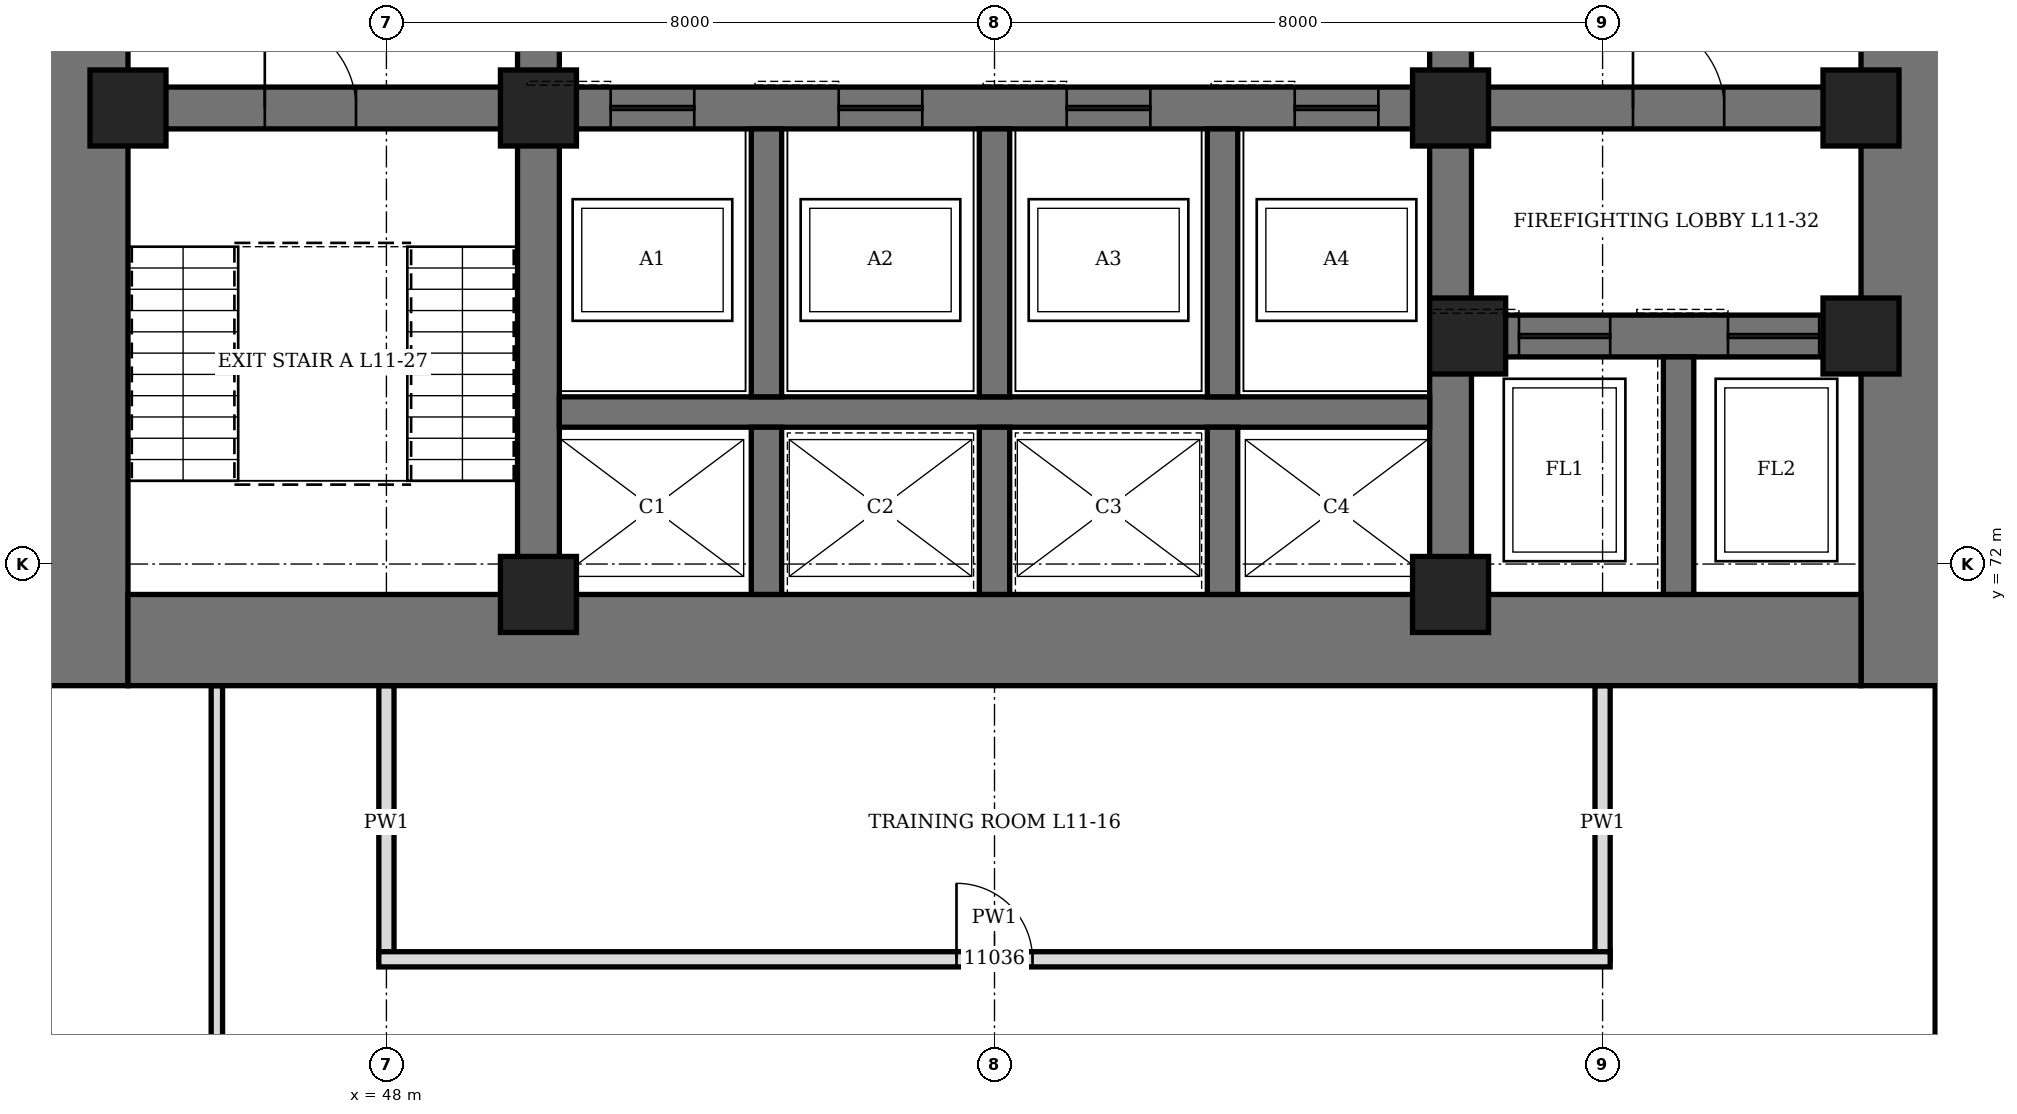
"""IFC4 building model, lengths in metres.
Left out: names, types, materials, properties, quantities, classifications, styles, units other than length and angle.
Written with IfcOpenShell. Run it as: python <this file> out.ifc"""

import sys

from ifc_helpers import new_model, si_unit, direction, frame, frame_2d, origin, origin_2d, place, context, subcontext, project, spatial, rectangle, hollow_rectangle, extrude, element, fill, save


model = new_model("IFC4")
c1 = context("Model", 3, precision=1e-05, world=origin(), true_north=direction((0.0, 1.0)))
c2 = subcontext(c1, "Body", "Model", "MODEL_VIEW")
j1 = project(units=[si_unit("LENGTHUNIT", "METRE"), si_unit("PLANEANGLEUNIT", "RADIAN")], contexts=[c1])
p1 = place(None, origin())
s1 = spatial("IfcSite", under=j1, at=p1, CompositionType="ELEMENT")
p2 = place(p1, origin())
s2 = spatial("IfcBuilding", under=s1, at=p2, CompositionType="ELEMENT")
p3 = place(p2, frame((0.0, 0.0, 55.9)))
s3 = spatial("IfcBuildingStorey", under=s2, at=p3, CompositionType="ELEMENT", Elevation=55.9)
p4 = place(p3, frame((44.0, 70.4, 0.0), z_axis=(0.0, 0.0, 1.0), x_axis=(0.0, 1.0, 0.0)))
e1 = element("IfcWall", 1, at=p4, inside=s3, PredefinedType="SHEAR", context=c2, shape_type="SweptSolid", body=[
    extrude(rectangle(XDim=19.2, YDim=1.2, at=frame_2d((9.6, 0.0))), origin(), (0.0, 0.0, 1.0), 4.2),
])
p5 = place(p4, frame((8.6, 0.0, 0.0)))
e2 = element("IfcOpeningElement", 2, at=p5, cuts=e1, PredefinedType="OPENING", context=c2, shape_type="SweptSolid", body=[
    extrude(rectangle(XDim=2.0, YDim=2.4, at=frame_2d((1.0, 1.2))), frame((0.0, 0.61, 0.0), z_axis=(0.0, -1.0, 0.0), x_axis=(1.0, 0.0, 0.0)), (0.0, 0.0, 1.0), 1.22),
])
p6 = place(p3, frame((68.0, 70.4, 0.0), z_axis=(0.0, 0.0, 1.0), x_axis=(0.0, 1.0, 0.0)))
e3 = element("IfcWall", 3, at=p6, inside=s3, PredefinedType="SHEAR", context=c2, shape_type="SweptSolid", body=[
    extrude(rectangle(XDim=19.2, YDim=1.2, at=frame_2d((9.6, 0.0))), origin(), (0.0, 0.0, 1.0), 4.2),
])
p7 = place(p6, frame((8.6, 0.0, 0.0)))
e4 = element("IfcOpeningElement", 4, at=p7, cuts=e3, PredefinedType="OPENING", context=c2, shape_type="SweptSolid", body=[
    extrude(rectangle(XDim=2.0, YDim=2.4, at=frame_2d((1.0, 1.2))), frame((0.0, 0.61, 0.0), z_axis=(0.0, -1.0, 0.0), x_axis=(1.0, 0.0, 0.0)), (0.0, 0.0, 1.0), 1.22),
])
p8 = place(p3, frame((44.6, 71.0, 0.0), z_axis=(0.0, 0.0, 1.0), x_axis=(1.0, 0.0, 0.0)))
e5 = element("IfcWall", 5, at=p8, inside=s3, PredefinedType="SHEAR", context=c2, shape_type="SweptSolid", body=[
    extrude(rectangle(XDim=22.8, YDim=1.2, at=frame_2d((11.4, 0.0))), origin(), (0.0, 0.0, 1.0), 4.2),
])
p9 = place(p3, frame((50.0, 71.6, 0.0), z_axis=(0.0, 0.0, 1.0), x_axis=(0.0, 1.0, 0.0)))
e6 = element("IfcWall", 6, at=p9, inside=s3, PredefinedType="SHEAR", context=c2, shape_type="SweptSolid", body=[
    extrude(rectangle(XDim=16.8, YDim=0.55, at=frame_2d((8.4, 0.0))), origin(), (0.0, 0.0, 1.0), 4.2),
])
p10 = place(p9, frame((7.5, 0.0, 0.0)))
e7 = element("IfcOpeningElement", 7, at=p10, cuts=e6, PredefinedType="OPENING", context=c2, shape_type="SweptSolid", body=[
    extrude(rectangle(XDim=1.8, YDim=2.4, at=frame_2d((0.9, 1.2))), frame((0.0, 0.285, 0.0), z_axis=(0.0, -1.0, 0.0), x_axis=(1.0, 0.0, 0.0)), (0.0, 0.0, 1.0), 0.57),
])
p11 = place(p3, frame((62.0, 71.6, 0.0), z_axis=(0.0, 0.0, 1.0), x_axis=(0.0, 1.0, 0.0)))
e8 = element("IfcWall", 8, at=p11, inside=s3, PredefinedType="SHEAR", context=c2, shape_type="SweptSolid", body=[
    extrude(rectangle(XDim=16.8, YDim=0.55, at=frame_2d((8.4, 0.0))), origin(), (0.0, 0.0, 1.0), 4.2),
])
p12 = place(p11, frame((7.5, 0.0, 0.0)))
e9 = element("IfcOpeningElement", 9, at=p12, cuts=e8, PredefinedType="OPENING", context=c2, shape_type="SweptSolid", body=[
    extrude(rectangle(XDim=1.8, YDim=2.4, at=frame_2d((0.9, 1.2))), frame((0.0, 0.285, 0.0), z_axis=(0.0, -1.0, 0.0), x_axis=(1.0, 0.0, 0.0)), (0.0, 0.0, 1.0), 0.57),
])
p13 = place(p3, frame((44.6, 78.0, 0.0), z_axis=(0.0, 0.0, 1.0), x_axis=(1.0, 0.0, 0.0)))
e10 = element("IfcWall", 10, at=p13, inside=s3, PredefinedType="SHEAR", context=c2, shape_type="SweptSolid", body=[
    extrude(rectangle(XDim=5.125, YDim=0.55, at=frame_2d((2.562, 0.0))), origin(), (0.0, 0.0, 1.0), 4.2),
])
p14 = place(p13, frame((1.8, 0.0, 0.0)))
e11 = element("IfcOpeningElement", 11, at=p14, cuts=e10, PredefinedType="OPENING", context=c2, shape_type="SweptSolid", body=[
    extrude(rectangle(XDim=1.2, YDim=2.1, at=frame_2d((0.6, 1.05))), frame((0.0, 0.285, 0.0), z_axis=(0.0, -1.0, 0.0), x_axis=(1.0, 0.0, 0.0)), (0.0, 0.0, 1.0), 0.57),
])
p15 = place(p3, frame((62.275, 75.0, 0.0), z_axis=(0.0, 0.0, 1.0), x_axis=(1.0, 0.0, 0.0)))
e12 = element("IfcWall", 12, at=p15, inside=s3, PredefinedType="SHEAR", context=c2, shape_type="SweptSolid", body=[
    extrude(rectangle(XDim=5.125, YDim=0.55, at=frame_2d((2.562, 0.0))), origin(), (0.0, 0.0, 1.0), 4.2),
])
p16 = place(p15, frame((0.625, 0.0, 0.0)))
e13 = element("IfcOpeningElement", 13, at=p16, cuts=e12, PredefinedType="OPENING", context=c2, shape_type="SweptSolid", body=[
    extrude(rectangle(XDim=1.2, YDim=2.2, at=frame_2d((0.6, 1.1))), frame((0.0, 0.285, 0.0), z_axis=(0.0, -1.0, 0.0), x_axis=(1.0, 0.0, 0.0)), (0.0, 0.0, 1.0), 0.57),
])
p17 = place(p15, frame((3.375, 0.0, 0.0)))
e14 = element("IfcOpeningElement", 14, at=p17, cuts=e12, PredefinedType="OPENING", context=c2, shape_type="SweptSolid", body=[
    extrude(rectangle(XDim=1.2, YDim=2.2, at=frame_2d((0.6, 1.1))), frame((0.0, 0.285, 0.0), z_axis=(0.0, -1.0, 0.0), x_axis=(1.0, 0.0, 0.0)), (0.0, 0.0, 1.0), 0.57),
])
p18 = place(p3, frame((62.275, 78.0, 0.0), z_axis=(0.0, 0.0, 1.0), x_axis=(1.0, 0.0, 0.0)))
e15 = element("IfcWall", 15, at=p18, inside=s3, PredefinedType="SHEAR", context=c2, shape_type="SweptSolid", body=[
    extrude(rectangle(XDim=5.125, YDim=0.55, at=frame_2d((2.562, 0.0))), origin(), (0.0, 0.0, 1.0), 4.2),
])
p19 = place(p18, frame((2.125, 0.0, 0.0)))
e16 = element("IfcOpeningElement", 16, at=p19, cuts=e15, PredefinedType="OPENING", context=c2, shape_type="SweptSolid", body=[
    extrude(rectangle(XDim=1.2, YDim=2.1, at=frame_2d((0.6, 1.05))), frame((0.0, 0.285, 0.0), z_axis=(0.0, -1.0, 0.0), x_axis=(1.0, 0.0, 0.0)), (0.0, 0.0, 1.0), 0.57),
])
p20 = place(p3, frame((50.275, 78.0, 0.0), z_axis=(0.0, 0.0, 1.0), x_axis=(1.0, 0.0, 0.0)))
e17 = element("IfcWall", 17, at=p20, inside=s3, PredefinedType="SHEAR", context=c2, shape_type="SweptSolid", body=[
    extrude(rectangle(XDim=11.45, YDim=0.55, at=frame_2d((5.725, 0.0))), origin(), (0.0, 0.0, 1.0), 4.2),
])
p21 = place(p20, frame((0.675, 0.0, 0.0)))
e18 = element("IfcOpeningElement", 18, at=p21, cuts=e17, PredefinedType="OPENING", context=c2, shape_type="SweptSolid", body=[
    extrude(rectangle(XDim=1.1, YDim=2.2, at=frame_2d((0.55, 1.1))), frame((0.0, 0.285, 0.0), z_axis=(0.0, -1.0, 0.0), x_axis=(1.0, 0.0, 0.0)), (0.0, 0.0, 1.0), 0.57),
])
p22 = place(p20, frame((3.675, 0.0, 0.0)))
e19 = element("IfcOpeningElement", 19, at=p22, cuts=e17, PredefinedType="OPENING", context=c2, shape_type="SweptSolid", body=[
    extrude(rectangle(XDim=1.1, YDim=2.2, at=frame_2d((0.55, 1.1))), frame((0.0, 0.285, 0.0), z_axis=(0.0, -1.0, 0.0), x_axis=(1.0, 0.0, 0.0)), (0.0, 0.0, 1.0), 0.57),
])
p23 = place(p20, frame((6.675, 0.0, 0.0)))
e20 = element("IfcOpeningElement", 20, at=p23, cuts=e17, PredefinedType="OPENING", context=c2, shape_type="SweptSolid", body=[
    extrude(rectangle(XDim=1.1, YDim=2.2, at=frame_2d((0.55, 1.1))), frame((0.0, 0.285, 0.0), z_axis=(0.0, -1.0, 0.0), x_axis=(1.0, 0.0, 0.0)), (0.0, 0.0, 1.0), 0.57),
])
p24 = place(p20, frame((9.675, 0.0, 0.0)))
e21 = element("IfcOpeningElement", 21, at=p24, cuts=e17, PredefinedType="OPENING", context=c2, shape_type="SweptSolid", body=[
    extrude(rectangle(XDim=1.1, YDim=2.2, at=frame_2d((0.55, 1.1))), frame((0.0, 0.285, 0.0), z_axis=(0.0, -1.0, 0.0), x_axis=(1.0, 0.0, 0.0)), (0.0, 0.0, 1.0), 0.57),
])
p25 = place(p3, frame((50.275, 74.0, 0.0), z_axis=(0.0, 0.0, 1.0), x_axis=(1.0, 0.0, 0.0)))
e22 = element("IfcWall", 22, at=p25, inside=s3, PredefinedType="SHEAR", context=c2, shape_type="SweptSolid", body=[
    extrude(rectangle(XDim=11.45, YDim=0.4, at=frame_2d((5.725, 0.0))), origin(), (0.0, 0.0, 1.0), 4.2),
])
p26 = place(p3, frame((53.0, 71.6, 0.0), z_axis=(0.0, 0.0, 1.0), x_axis=(0.0, 1.0, 0.0)))
e23 = element("IfcWall", 23, at=p26, inside=s3, PredefinedType="SHEAR", context=c2, shape_type="SweptSolid", body=[
    extrude(rectangle(XDim=2.2, YDim=0.4, at=frame_2d((1.1, 0.0))), origin(), (0.0, 0.0, 1.0), 4.2),
])
p27 = place(p3, frame((53.0, 74.2, 0.0), z_axis=(0.0, 0.0, 1.0), x_axis=(0.0, 1.0, 0.0)))
e24 = element("IfcWall", 24, at=p27, inside=s3, PredefinedType="SHEAR", context=c2, shape_type="SweptSolid", body=[
    extrude(rectangle(XDim=3.525, YDim=0.4, at=frame_2d((1.763, 0.0))), origin(), (0.0, 0.0, 1.0), 4.2),
])
p28 = place(p3, frame((56.0, 71.6, 0.0), z_axis=(0.0, 0.0, 1.0), x_axis=(0.0, 1.0, 0.0)))
e25 = element("IfcWall", 25, at=p28, inside=s3, PredefinedType="SHEAR", context=c2, shape_type="SweptSolid", body=[
    extrude(rectangle(XDim=2.2, YDim=0.4, at=frame_2d((1.1, 0.0))), origin(), (0.0, 0.0, 1.0), 4.2),
])
p29 = place(p3, frame((56.0, 74.2, 0.0), z_axis=(0.0, 0.0, 1.0), x_axis=(0.0, 1.0, 0.0)))
e26 = element("IfcWall", 26, at=p29, inside=s3, PredefinedType="SHEAR", context=c2, shape_type="SweptSolid", body=[
    extrude(rectangle(XDim=3.525, YDim=0.4, at=frame_2d((1.763, 0.0))), origin(), (0.0, 0.0, 1.0), 4.2),
])
p30 = place(p3, frame((59.0, 71.6, 0.0), z_axis=(0.0, 0.0, 1.0), x_axis=(0.0, 1.0, 0.0)))
e27 = element("IfcWall", 27, at=p30, inside=s3, PredefinedType="SHEAR", context=c2, shape_type="SweptSolid", body=[
    extrude(rectangle(XDim=2.2, YDim=0.4, at=frame_2d((1.1, 0.0))), origin(), (0.0, 0.0, 1.0), 4.2),
])
p31 = place(p3, frame((59.0, 74.2, 0.0), z_axis=(0.0, 0.0, 1.0), x_axis=(0.0, 1.0, 0.0)))
e28 = element("IfcWall", 28, at=p31, inside=s3, PredefinedType="SHEAR", context=c2, shape_type="SweptSolid", body=[
    extrude(rectangle(XDim=3.525, YDim=0.4, at=frame_2d((1.763, 0.0))), origin(), (0.0, 0.0, 1.0), 4.2),
])
p32 = place(p3, frame((65.0, 71.6, 0.0), z_axis=(0.0, 0.0, 1.0), x_axis=(0.0, 1.0, 0.0)))
e29 = element("IfcWall", 29, at=p32, inside=s3, PredefinedType="SHEAR", context=c2, shape_type="SweptSolid", body=[
    extrude(rectangle(XDim=3.125, YDim=0.4, at=frame_2d((1.562, 0.0))), origin(), (0.0, 0.0, 1.0), 4.2),
])
for number, where, z_axis, x_axis in (
    (30, (44.6, 78.0, 0.0), (0.0, 0.0, 1.0), (1.0, 0.0, 0.0)),
    (31, (50.0, 71.6, 0.0), (0.0, 0.0, 1.0), (1.0, 0.0, 0.0)),
    (32, (50.0, 78.0, 0.0), (0.0, 0.0, 1.0), (1.0, 0.0, 0.0)),
    (33, (62.0, 71.6, 0.0), (0.0, 0.0, 1.0), (1.0, 0.0, 0.0)),
    (34, (62.0, 78.0, 0.0), (0.0, 0.0, 1.0), (1.0, 0.0, 0.0)),
    (35, (62.225, 75.0, 0.0), (0.0, 0.0, 1.0), (1.0, 0.0, 0.0)),
    (36, (67.4, 75.0, 0.0), (0.0, 0.0, 1.0), (1.0, 0.0, 0.0)),
    (37, (67.4, 78.0, 0.0), (0.0, 0.0, 1.0), (1.0, 0.0, 0.0)),
):
    element("IfcColumn", number, at=place(p3, frame(where, z_axis=z_axis, x_axis=x_axis)), inside=s3, PredefinedType="COLUMN", context=c2, shape_type="SweptSolid", body=[
        extrude(hollow_rectangle(XDim=1.0, YDim=1.0, WallThickness=0.15, at=origin_2d()), origin(), (0.0, 0.0, 1.0), 4.2),
    ])
for number, where, z_axis, x_axis in (
    (38, (48.0, 66.8, 0.0), (0.0, 0.0, 1.0), (0.0, 1.0, 0.0)),
    (39, (64.0, 66.8, 0.0), (0.0, 0.0, 1.0), (0.0, 1.0, 0.0)),
):
    element("IfcWall", number, at=place(p3, frame(where, z_axis=z_axis, x_axis=x_axis)), inside=s3, PredefinedType="PARTITIONING", context=c2, shape_type="SweptSolid", body=[
        extrude(rectangle(XDim=3.6, YDim=0.2, at=frame_2d((1.8, 0.0))), origin(), (0.0, 0.0, 1.0), 4.04),
    ])
p33 = place(p3, frame((47.9, 66.8, 0.0), z_axis=(0.0, 0.0, 1.0), x_axis=(1.0, 0.0, 0.0)))
e40 = element("IfcWall", 40, at=p33, inside=s3, PredefinedType="PARTITIONING", context=c2, shape_type="SweptSolid", body=[
    extrude(rectangle(XDim=16.2, YDim=0.2, at=frame_2d((8.1, 0.0))), origin(), (0.0, 0.0, 1.0), 4.04),
])
p34 = place(p33, frame((7.6, 0.0, 0.0)))
e41 = element("IfcOpeningElement", 41, at=p34, cuts=e40, PredefinedType="OPENING", context=c2, shape_type="SweptSolid", body=[
    extrude(rectangle(XDim=1.0, YDim=2.1, at=frame_2d((0.5, 1.05))), frame((0.0, 0.11, 0.0), z_axis=(0.0, -1.0, 0.0), x_axis=(1.0, 0.0, 0.0)), (0.0, 0.0, 1.0), 0.22),
])
p35 = place(p3, frame((45.769, 55.31, 0.0), z_axis=(0.0, 0.0, 1.0), x_axis=(0.0, 1.0, 0.0)))
e42 = element("IfcWall", 42, at=p35, inside=s3, PredefinedType="PARTITIONING", context=c2, shape_type="SweptSolid", body=[
    extrude(rectangle(XDim=15.09, YDim=0.15, at=frame_2d((7.545, 0.0))), origin(), (0.0, 0.0, 1.0), 3.278),
])
p36 = place(p35, frame((7.045, 0.0, 0.0)))
e43 = element("IfcOpeningElement", 43, at=p36, cuts=e42, PredefinedType="OPENING", context=c2, shape_type="SweptSolid", body=[
    extrude(rectangle(XDim=1.0, YDim=2.4, at=frame_2d((0.5, 1.2))), frame((0.0, 0.085, 0.0), z_axis=(0.0, -1.0, 0.0), x_axis=(1.0, 0.0, 0.0)), (0.0, 0.0, 1.0), 0.17),
])
p37 = place(p3, frame((68.45, 55.31, 0.0), z_axis=(0.0, 0.0, 1.0), x_axis=(0.0, 1.0, 0.0)))
e44 = element("IfcWall", 44, at=p37, inside=s3, PredefinedType="PARTITIONING", context=c2, shape_type="SweptSolid", body=[
    extrude(rectangle(XDim=15.09, YDim=0.15, at=frame_2d((7.545, 0.0))), origin(), (0.0, 0.0, 1.0), 4.04),
])
p38 = place(p37, frame((7.045, 0.0, 0.0)))
e45 = element("IfcOpeningElement", 45, at=p38, cuts=e44, PredefinedType="OPENING", context=c2, shape_type="SweptSolid", body=[
    extrude(rectangle(XDim=1.0, YDim=2.4, at=frame_2d((0.5, 1.2))), frame((0.0, 0.085, 0.0), z_axis=(0.0, -1.0, 0.0), x_axis=(1.0, 0.0, 0.0)), (0.0, 0.0, 1.0), 0.17),
])
p39 = place(p14, origin())
e46 = element("IfcDoor", 46, at=p39, inside=s3, OperationType="SINGLE_SWING_LEFT", PredefinedType="DOOR", context=c2, shape_type="SweptSolid", body=[
    extrude(rectangle(XDim=1.2, YDim=2.1, at=frame_2d((0.6, 1.05))), frame((0.0, 0.275, 0.0), z_axis=(0.0, -1.0, 0.0), x_axis=(1.0, 0.0, 0.0)), (0.0, 0.0, 1.0), 0.55),
])
fill(e11, e46)
p40 = place(p19, origin())
e47 = element("IfcDoor", 47, at=p40, inside=s3, OperationType="SINGLE_SWING_RIGHT", PredefinedType="DOOR", context=c2, shape_type="SweptSolid", body=[
    extrude(rectangle(XDim=1.2, YDim=2.1, at=frame_2d((0.6, 1.05))), frame((0.0, 0.275, 0.0), z_axis=(0.0, -1.0, 0.0), x_axis=(1.0, 0.0, 0.0)), (0.0, 0.0, 1.0), 0.55),
])
fill(e16, e47)
p41 = place(p21, origin())
e48 = element("IfcDoor", 48, at=p41, inside=s3, OperationType="SLIDING_TO_LEFT", PredefinedType="DOOR", context=c2, shape_type="SweptSolid", body=[
    extrude(rectangle(XDim=1.1, YDim=2.2, at=frame_2d((0.55, 1.1))), frame((0.0, 0.275, 0.0), z_axis=(0.0, -1.0, 0.0), x_axis=(1.0, 0.0, 0.0)), (0.0, 0.0, 1.0), 0.55),
])
fill(e18, e48)
p42 = place(p22, origin())
e49 = element("IfcDoor", 49, at=p42, inside=s3, OperationType="SLIDING_TO_LEFT", PredefinedType="DOOR", context=c2, shape_type="SweptSolid", body=[
    extrude(rectangle(XDim=1.1, YDim=2.2, at=frame_2d((0.55, 1.1))), frame((0.0, 0.275, 0.0), z_axis=(0.0, -1.0, 0.0), x_axis=(1.0, 0.0, 0.0)), (0.0, 0.0, 1.0), 0.55),
])
fill(e19, e49)
p43 = place(p23, origin())
e50 = element("IfcDoor", 50, at=p43, inside=s3, OperationType="SLIDING_TO_LEFT", PredefinedType="DOOR", context=c2, shape_type="SweptSolid", body=[
    extrude(rectangle(XDim=1.1, YDim=2.2, at=frame_2d((0.55, 1.1))), frame((0.0, 0.275, 0.0), z_axis=(0.0, -1.0, 0.0), x_axis=(1.0, 0.0, 0.0)), (0.0, 0.0, 1.0), 0.55),
])
fill(e20, e50)
p44 = place(p24, origin())
e51 = element("IfcDoor", 51, at=p44, inside=s3, OperationType="SLIDING_TO_LEFT", PredefinedType="DOOR", context=c2, shape_type="SweptSolid", body=[
    extrude(rectangle(XDim=1.1, YDim=2.2, at=frame_2d((0.55, 1.1))), frame((0.0, 0.275, 0.0), z_axis=(0.0, -1.0, 0.0), x_axis=(1.0, 0.0, 0.0)), (0.0, 0.0, 1.0), 0.55),
])
fill(e21, e51)
p45 = place(p16, origin())
e52 = element("IfcDoor", 52, at=p45, inside=s3, OperationType="SLIDING_TO_LEFT", PredefinedType="DOOR", context=c2, shape_type="SweptSolid", body=[
    extrude(rectangle(XDim=1.2, YDim=2.2, at=frame_2d((0.6, 1.1))), frame((0.0, 0.275, 0.0), z_axis=(0.0, -1.0, 0.0), x_axis=(1.0, 0.0, 0.0)), (0.0, 0.0, 1.0), 0.55),
])
fill(e13, e52)
p46 = place(p17, origin())
e53 = element("IfcDoor", 53, at=p46, inside=s3, OperationType="SLIDING_TO_LEFT", PredefinedType="DOOR", context=c2, shape_type="SweptSolid", body=[
    extrude(rectangle(XDim=1.2, YDim=2.2, at=frame_2d((0.6, 1.1))), frame((0.0, 0.275, 0.0), z_axis=(0.0, -1.0, 0.0), x_axis=(1.0, 0.0, 0.0)), (0.0, 0.0, 1.0), 0.55),
])
fill(e14, e53)
p47 = place(p34, origin())
e54 = element("IfcDoor", 54, at=p47, inside=s3, OperationType="SINGLE_SWING_LEFT", PredefinedType="DOOR", context=c2, shape_type="SweptSolid", body=[
    extrude(rectangle(XDim=1.0, YDim=2.1, at=frame_2d((0.5, 1.05))), frame((0.0, 0.1, 0.0), z_axis=(0.0, -1.0, 0.0), x_axis=(1.0, 0.0, 0.0)), (0.0, 0.0, 1.0), 0.199),
])
fill(e41, e54)
save(model, sys.argv[1])
